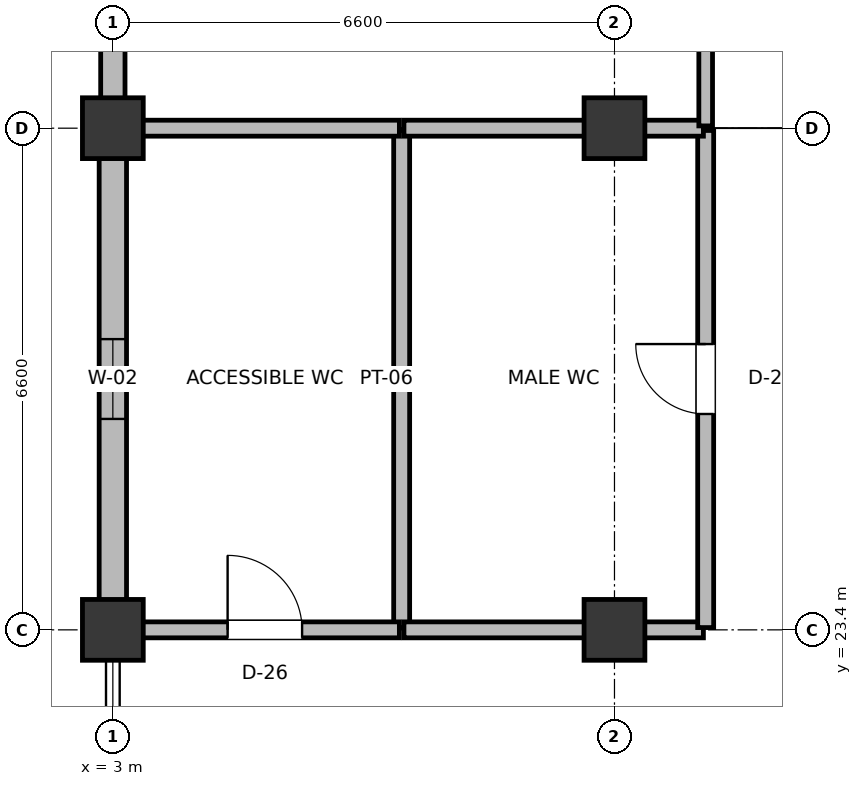
"""IFC4 building model, lengths in metres.
Left out: names, types, materials, properties, quantities, classifications, styles, units other than length and angle.
Written with IfcOpenShell. Run it as: python <this file> out.ifc"""

import sys

from ifc_helpers import new_model, si_unit, direction, frame, frame_2d, origin, origin_2d, place, context, subcontext, project, spatial, rectangle, extrude, element, fill, save


model = new_model("IFC4")
c1 = context("Model", 3, precision=1e-05, world=origin(), true_north=direction((0.0, 1.0)))
c2 = subcontext(c1, "Body", "Model", "MODEL_VIEW")
j1 = project(units=[si_unit("LENGTHUNIT", "METRE"), si_unit("PLANEANGLEUNIT", "RADIAN")], contexts=[c1])
p1 = place(None, origin())
s1 = spatial("IfcSite", under=j1, at=p1, CompositionType="ELEMENT")
p2 = place(p1, origin())
s2 = spatial("IfcBuilding", under=s1, at=p2, CompositionType="ELEMENT")
p3 = place(p2, frame((0.0, 0.0, 24.0)))
s3 = spatial("IfcBuildingStorey", under=s2, at=p3, CompositionType="ELEMENT", Elevation=24.0)
for number, where, z_axis, x_axis in (
    (1, (3.0, 23.4, 0.0), (0.0, 0.0, 1.0), (1.0, 0.0, 0.0)),
    (2, (3.0, 30.0, 0.0), (0.0, 0.0, 1.0), (1.0, 0.0, 0.0)),
    (3, (9.6, 23.4, 0.0), (0.0, 0.0, 1.0), (1.0, 0.0, 0.0)),
    (4, (9.6, 30.0, 0.0), (0.0, 0.0, 1.0), (1.0, 0.0, 0.0)),
):
    element("IfcColumn", number, at=place(p3, frame(where, z_axis=z_axis, x_axis=x_axis)), inside=s3, PredefinedType="COLUMN", context=c2, shape_type="SweptSolid", body=[
        extrude(rectangle(XDim=0.8, YDim=0.8, at=origin_2d()), origin(), (0.0, 0.0, 1.0), 4.5),
    ])
p4 = place(p3, frame((3.0, 23.785, 0.0), z_axis=(0.0, 0.0, 1.0), x_axis=(0.0, 1.0, 0.0)))
e5 = element("IfcWall", 5, at=p4, inside=s3, PredefinedType="SOLIDWALL", context=c2, shape_type="SweptSolid", body=[
    extrude(rectangle(XDim=5.83, YDim=0.36, at=frame_2d((2.915, 0.0))), origin(), (0.0, 0.0, 1.0), 3.575),
])
p5 = place(p4, frame((2.39, 0.0, 0.9)))
e6 = element("IfcOpeningElement", 6, at=p5, cuts=e5, PredefinedType="OPENING", context=c2, shape_type="SweptSolid", body=[
    extrude(rectangle(XDim=1.05, YDim=1.8, at=frame_2d((0.525, 0.9))), frame((0.0, 0.19, 0.0), z_axis=(0.0, -1.0, 0.0), x_axis=(1.0, 0.0, 0.0)), (0.0, 0.0, 1.0), 0.38),
])
p6 = place(p3, frame((3.0, 30.385, 0.0), z_axis=(0.0, 0.0, 1.0), x_axis=(0.0, 1.0, 0.0)))
e7 = element("IfcWall", 7, at=p6, inside=s3, PredefinedType="SOLIDWALL", context=c2, shape_type="SweptSolid", body=[
    extrude(rectangle(XDim=8.28, YDim=0.32, at=frame_2d((4.14, 0.0))), origin(), (0.0, 0.0, 1.0), 3.545),
])
p7 = place(p6, frame((3.765, 0.0, 0.9)))
e8 = element("IfcOpeningElement", 8, at=p7, cuts=e7, PredefinedType="OPENING", context=c2, shape_type="SweptSolid", body=[
    extrude(rectangle(XDim=0.75, YDim=1.75, at=frame_2d((0.375, 0.875))), frame((0.0, 0.17, 0.0), z_axis=(0.0, -1.0, 0.0), x_axis=(1.0, 0.0, 0.0)), (0.0, 0.0, 1.0), 0.34),
])
p8 = place(p3, frame((6.8, 23.43, 0.0), z_axis=(0.0, 0.0, 1.0), x_axis=(0.0, 1.0, 0.0)))
e9 = element("IfcWall", 9, at=p8, inside=s3, PredefinedType="PLUMBINGWALL", context=c2, shape_type="SweptSolid", body=[
    extrude(rectangle(XDim=6.54, YDim=0.21, at=frame_2d((3.27, 0.0))), origin(), (0.0, 0.0, 1.0), 3.415),
])
p9 = place(p3, frame((3.23, 23.4, 0.0), z_axis=(0.0, 0.0, 1.0), x_axis=(1.0, 0.0, 0.0)))
e10 = element("IfcWall", 10, at=p9, inside=s3, PredefinedType="PLUMBINGWALL", context=c2, shape_type="SweptSolid", body=[
    extrude(rectangle(XDim=3.54, YDim=0.21, at=frame_2d((1.77, 0.0))), origin(), (0.0, 0.0, 1.0), 3.415),
])
p10 = place(p9, frame((1.28, 0.0, 0.0)))
e11 = element("IfcOpeningElement", 11, at=p10, cuts=e10, PredefinedType="OPENING", context=c2, shape_type="SweptSolid", body=[
    extrude(rectangle(XDim=0.98, YDim=2.1, at=frame_2d((0.49, 1.05))), frame((0.0, 0.115, 0.0), z_axis=(0.0, -1.0, 0.0), x_axis=(1.0, 0.0, 0.0)), (0.0, 0.0, 1.0), 0.23),
])
p11 = place(p3, frame((3.23, 30.0, 0.0), z_axis=(0.0, 0.0, 1.0), x_axis=(1.0, 0.0, 0.0)))
e12 = element("IfcWall", 12, at=p11, inside=s3, PredefinedType="PLUMBINGWALL", context=c2, shape_type="SweptSolid", body=[
    extrude(rectangle(XDim=3.54, YDim=0.21, at=frame_2d((1.77, 0.0))), origin(), (0.0, 0.0, 1.0), 3.495),
])
p12 = place(p3, frame((6.83, 23.4, 0.0), z_axis=(0.0, 0.0, 1.0), x_axis=(1.0, 0.0, 0.0)))
e13 = element("IfcWall", 13, at=p12, inside=s3, PredefinedType="PLUMBINGWALL", context=c2, shape_type="SweptSolid", body=[
    extrude(rectangle(XDim=3.94, YDim=0.21, at=frame_2d((1.97, 0.0))), origin(), (0.0, 0.0, 1.0), 3.415),
])
p13 = place(p3, frame((10.8, 23.43, 0.0), z_axis=(0.0, 0.0, 1.0), x_axis=(0.0, 1.0, 0.0)))
e14 = element("IfcWall", 14, at=p13, inside=s3, PredefinedType="PLUMBINGWALL", context=c2, shape_type="SweptSolid", body=[
    extrude(rectangle(XDim=6.54, YDim=0.21, at=frame_2d((3.27, 0.0))), origin(), (0.0, 0.0, 1.0), 3.525),
])
p14 = place(p13, frame((2.81, 0.0, 0.0)))
e15 = element("IfcOpeningElement", 15, at=p14, cuts=e14, PredefinedType="OPENING", context=c2, shape_type="SweptSolid", body=[
    extrude(rectangle(XDim=0.92, YDim=2.1, at=frame_2d((0.46, 1.05))), frame((0.0, 0.115, 0.0), z_axis=(0.0, -1.0, 0.0), x_axis=(1.0, 0.0, 0.0)), (0.0, 0.0, 1.0), 0.23),
])
p15 = place(p3, frame((6.83, 30.0, 0.0), z_axis=(0.0, 0.0, 1.0), x_axis=(1.0, 0.0, 0.0)))
e16 = element("IfcWall", 16, at=p15, inside=s3, PredefinedType="PLUMBINGWALL", context=c2, shape_type="SweptSolid", body=[
    extrude(rectangle(XDim=3.94, YDim=0.21, at=frame_2d((1.97, 0.0))), origin(), (0.0, 0.0, 1.0), 3.495),
])
p16 = place(p3, frame((10.8, 30.03, 0.0), z_axis=(0.0, 0.0, 1.0), x_axis=(0.0, 1.0, 0.0)))
e17 = element("IfcWall", 17, at=p16, inside=s3, PredefinedType="PARTITIONING", context=c2, shape_type="SweptSolid", body=[
    extrude(rectangle(XDim=21.94, YDim=0.18, at=frame_2d((10.97, 0.0))), origin(), (0.0, 0.0, 1.0), 3.395),
])
p17 = place(p16, frame((10.445, 0.0, 0.0)))
e18 = element("IfcOpeningElement", 18, at=p17, cuts=e17, PredefinedType="OPENING", context=c2, shape_type="SweptSolid", body=[
    extrude(rectangle(XDim=1.05, YDim=2.2, at=frame_2d((0.525, 1.1))), frame((0.0, 0.1, 0.0), z_axis=(0.0, -1.0, 0.0), x_axis=(1.0, 0.0, 0.0)), (0.0, 0.0, 1.0), 0.2),
])
p18 = place(p5, origin())
e19 = element("IfcWindow", 19, at=p18, inside=s3, PartitioningType="SINGLE_PANEL", PredefinedType="WINDOW", context=c2, shape_type="SweptSolid", body=[
    extrude(rectangle(XDim=1.05, YDim=1.8, at=frame_2d((0.525, 0.9))), frame((0.0, 0.03, 0.0), z_axis=(0.0, -1.0, 0.0), x_axis=(1.0, 0.0, 0.0)), (0.0, 0.0, 1.0), 0.06),
])
fill(e6, e19)
p19 = place(p10, origin())
e20 = element("IfcDoor", 20, at=p19, inside=s3, OperationType="SINGLE_SWING_LEFT", PredefinedType="DOOR", context=c2, shape_type="SweptSolid", body=[
    extrude(rectangle(XDim=0.98, YDim=2.1, at=frame_2d((0.49, 1.05))), frame((0.0, 0.025, 0.0), z_axis=(0.0, -1.0, 0.0), x_axis=(1.0, 0.0, 0.0)), (0.0, 0.0, 1.0), 0.05),
])
fill(e11, e20)
p20 = place(p14, origin())
e21 = element("IfcDoor", 21, at=p20, inside=s3, OperationType="SINGLE_SWING_RIGHT", PredefinedType="DOOR", context=c2, shape_type="SweptSolid", body=[
    extrude(rectangle(XDim=0.92, YDim=2.1, at=frame_2d((0.46, 1.05))), frame((0.0, 0.025, 0.0), z_axis=(0.0, -1.0, 0.0), x_axis=(1.0, 0.0, 0.0)), (0.0, 0.0, 1.0), 0.05),
])
fill(e15, e21)
save(model, sys.argv[1])
